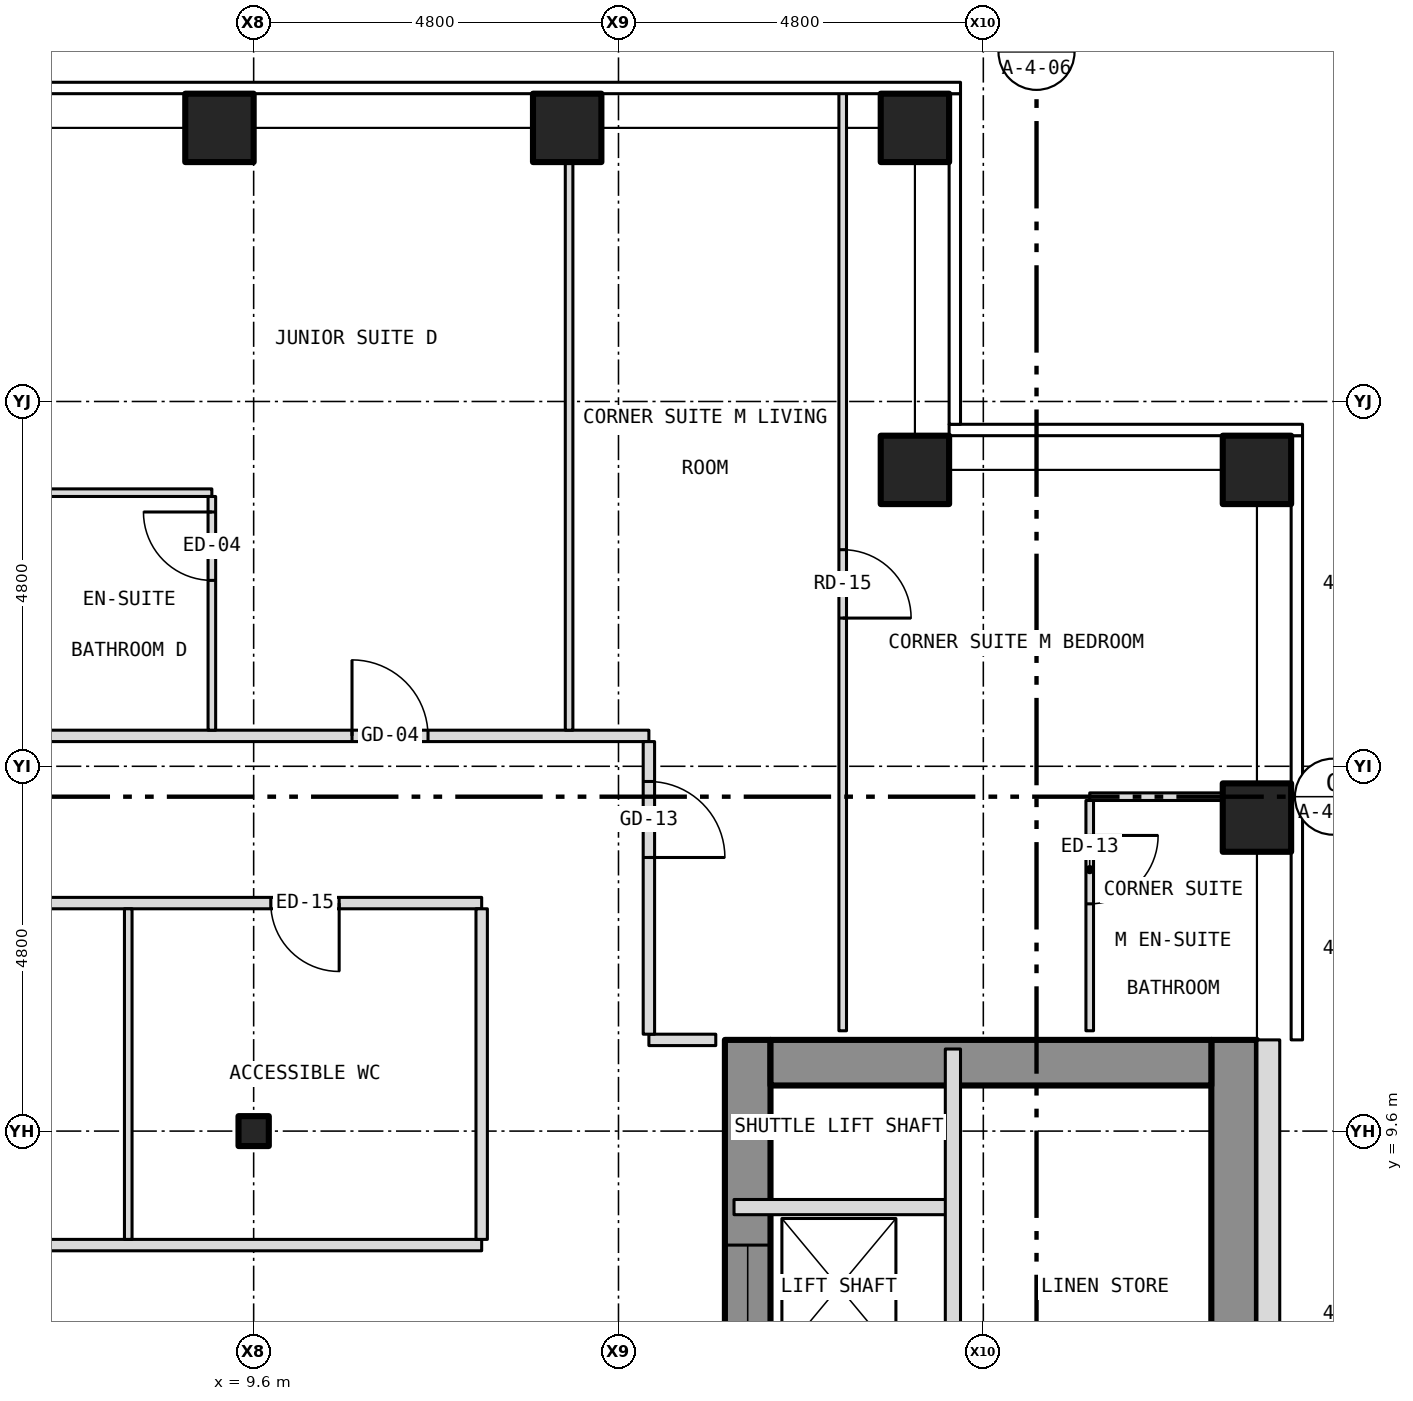
"""IFC4 building model, lengths in metres.
Left out: names, types, materials, properties, quantities, classifications, styles, units other than length and angle.
Written with IfcOpenShell. Run it as: python <this file> out.ifc"""

import sys

from ifc_helpers import new_model, si_unit, direction, frame, frame_2d, origin, origin_2d, place, context, subcontext, project, spatial, rectangle, hollow_rectangle, i_section, extrude, element, fill, save


model = new_model("IFC4")
c1 = context("Model", 3, precision=1e-05, world=origin(), true_north=direction((0.0, 1.0)))
c2 = subcontext(c1, "Body", "Model", "MODEL_VIEW")
j1 = project(units=[si_unit("LENGTHUNIT", "METRE"), si_unit("PLANEANGLEUNIT", "RADIAN")], contexts=[c1])
p1 = place(None, origin())
s1 = spatial("IfcSite", under=j1, at=p1, CompositionType="ELEMENT")
p2 = place(p1, origin())
s2 = spatial("IfcBuilding", under=s1, at=p2, CompositionType="ELEMENT")
p3 = place(p2, frame((0.0, 0.0, 96.0)))
s3 = spatial("IfcBuildingStorey", under=s2, at=p3, CompositionType="ELEMENT", Elevation=96.0)
for number, where, z_axis, x_axis in (
    (1, (9.15, 22.8, -0.15), (0.0, 0.0, 1.0), (1.0, 0.0, 0.0)),
    (2, (13.725, 22.8, -0.15), (0.0, 0.0, 1.0), (1.0, 0.0, 0.0)),
    (3, (18.3, 22.8, -0.15), (0.0, 0.0, 1.0), (1.0, 0.0, 0.0)),
    (4, (22.8, 13.725, -0.15), (0.0, 0.0, 1.0), (1.0, 0.0, 0.0)),
    (5, (22.8, 18.3, -0.15), (0.0, 0.0, 1.0), (1.0, 0.0, 0.0)),
    (6, (18.3, 18.3, -0.15), (0.0, 0.0, 1.0), (1.0, 0.0, 0.0)),
):
    element("IfcColumn", number, at=place(p3, frame(where, z_axis=z_axis, x_axis=x_axis)), inside=s3, PredefinedType="COLUMN", context=c2, shape_type="SweptSolid", body=[
        extrude(hollow_rectangle(XDim=0.9, YDim=0.9, WallThickness=0.05, at=origin_2d()), origin(), (0.0, 0.0, 1.0), 3.5),
    ])
p4 = place(p3, frame((9.6, 9.6, -0.15), z_axis=(0.0, 0.0, 1.0), x_axis=(1.0, 0.0, 0.0)))
e7 = element("IfcColumn", 7, at=p4, inside=s3, PredefinedType="COLUMN", context=c2, shape_type="SweptSolid", body=[
    extrude(i_section(OverallWidth=0.399, OverallDepth=0.394, WebThickness=0.023, FlangeThickness=0.037, at=origin_2d()), origin(), (0.0, 0.0, 1.0), 3.5),
])
p5 = place(p3, frame((16.1, -10.8, 0.0), z_axis=(0.0, 0.0, 1.0), x_axis=(0.0, 1.0, 0.0)))
e8 = element("IfcWall", 8, at=p5, inside=s3, PredefinedType="SHEAR", context=c2, shape_type="SweptSolid", body=[
    extrude(rectangle(XDim=21.6, YDim=0.6, at=frame_2d((10.8, 0.0))), origin(), (0.0, 0.0, 1.0), 3.25),
])
p6 = place(p5, frame((9.4, 0.0, 0.0)))
e9 = element("IfcOpeningElement", 9, at=p6, cuts=e8, PredefinedType="OPENING", context=c2, shape_type="SweptSolid", body=[
    extrude(rectangle(XDim=1.1, YDim=2.1, at=frame_2d((0.55, 1.05))), frame((0.0, 0.312, 0.0), z_axis=(0.0, -1.0, 0.0), x_axis=(1.0, 0.0, 0.0)), (0.0, 0.0, 1.0), 0.624),
])
p7 = place(p5, frame((11.5, 0.0, 0.0)))
e10 = element("IfcOpeningElement", 10, at=p7, cuts=e8, PredefinedType="OPENING", context=c2, shape_type="SweptSolid", body=[
    extrude(rectangle(XDim=1.1, YDim=2.1, at=frame_2d((0.55, 1.05))), frame((0.0, 0.312, 0.0), z_axis=(0.0, -1.0, 0.0), x_axis=(1.0, 0.0, 0.0)), (0.0, 0.0, 1.0), 0.624),
])
p8 = place(p5, frame((13.6, 0.0, 0.0)))
e11 = element("IfcOpeningElement", 11, at=p8, cuts=e8, PredefinedType="OPENING", context=c2, shape_type="SweptSolid", body=[
    extrude(rectangle(XDim=1.1, YDim=2.1, at=frame_2d((0.55, 1.05))), frame((0.0, 0.312, 0.0), z_axis=(0.0, -1.0, 0.0), x_axis=(1.0, 0.0, 0.0)), (0.0, 0.0, 1.0), 0.624),
])
p9 = place(p5, frame((15.7, 0.0, 0.0)))
e12 = element("IfcOpeningElement", 12, at=p9, cuts=e8, PredefinedType="OPENING", context=c2, shape_type="SweptSolid", body=[
    extrude(rectangle(XDim=1.1, YDim=2.1, at=frame_2d((0.55, 1.05))), frame((0.0, 0.312, 0.0), z_axis=(0.0, -1.0, 0.0), x_axis=(1.0, 0.0, 0.0)), (0.0, 0.0, 1.0), 0.624),
])
p10 = place(p5, frame((17.8, 0.0, 0.0)))
e13 = element("IfcOpeningElement", 13, at=p10, cuts=e8, PredefinedType="OPENING", context=c2, shape_type="SweptSolid", body=[
    extrude(rectangle(XDim=1.1, YDim=2.1, at=frame_2d((0.55, 1.05))), frame((0.0, 0.312, 0.0), z_axis=(0.0, -1.0, 0.0), x_axis=(1.0, 0.0, 0.0)), (0.0, 0.0, 1.0), 0.624),
])
p11 = place(p5, frame((5.642, 0.0, 0.0)))
e14 = element("IfcOpeningElement", 14, at=p11, cuts=e8, PredefinedType="OPENING", context=c2, shape_type="SweptSolid", body=[
    extrude(rectangle(XDim=1.1, YDim=2.1, at=frame_2d((0.55, 1.05))), frame((0.0, 0.312, 0.0), z_axis=(0.0, -1.0, 0.0), x_axis=(1.0, 0.0, 0.0)), (0.0, 0.0, 1.0), 0.624),
])
p12 = place(p5, frame((7.5, 0.0, 0.0)))
e15 = element("IfcOpeningElement", 15, at=p12, cuts=e8, PredefinedType="OPENING", context=c2, shape_type="SweptSolid", body=[
    extrude(rectangle(XDim=1.1, YDim=2.1, at=frame_2d((0.55, 1.05))), frame((0.0, 0.312, 0.0), z_axis=(0.0, -1.0, 0.0), x_axis=(1.0, 0.0, 0.0)), (0.0, 0.0, 1.0), 0.624),
])
p13 = place(p3, frame((22.5, -10.8, 0.0), z_axis=(0.0, 0.0, 1.0), x_axis=(0.0, 1.0, 0.0)))
e16 = element("IfcWall", 16, at=p13, inside=s3, PredefinedType="SHEAR", context=c2, shape_type="SweptSolid", body=[
    extrude(rectangle(XDim=21.6, YDim=0.6, at=frame_2d((10.8, 0.0))), origin(), (0.0, 0.0, 1.0), 3.25),
])
p14 = place(p3, frame((16.4, 10.5, 0.0), z_axis=(0.0, 0.0, 1.0), x_axis=(1.0, 0.0, 0.0)))
e17 = element("IfcWall", 17, at=p14, inside=s3, PredefinedType="SHEAR", context=c2, shape_type="SweptSolid", body=[
    extrude(rectangle(XDim=5.8, YDim=0.6, at=frame_2d((2.9, 0.0))), origin(), (0.0, 0.0, 1.0), 3.25),
])
p15 = place(p3, frame((22.95, -10.8, 0.0), z_axis=(0.0, 0.0, 1.0), x_axis=(0.0, 1.0, 0.0)))
e18 = element("IfcWall", 18, at=p15, inside=s3, PredefinedType="SOLIDWALL", context=c2, shape_type="SweptSolid", body=[
    extrude(rectangle(XDim=21.6, YDim=0.3, at=frame_2d((10.8, 0.0))), origin(), (0.0, 0.0, 1.0), 3.5),
])
p16 = place(p15, frame((2.95, 0.0, 1.0)))
e19 = element("IfcOpeningElement", 19, at=p16, cuts=e18, PredefinedType="OPENING", context=c2, shape_type="SweptSolid", body=[
    extrude(rectangle(XDim=0.6, YDim=1.5, at=frame_2d((0.3, 0.75))), frame((0.0, 0.162, 0.0), z_axis=(0.0, -1.0, 0.0), x_axis=(1.0, 0.0, 0.0)), (0.0, 0.0, 1.0), 0.324),
])
p17 = place(p3, frame((3.3, 8.1, 0.0), z_axis=(0.0, 0.0, 1.0), x_axis=(1.0, 0.0, 0.0)))
e20 = element("IfcWall", 20, at=p17, inside=s3, PredefinedType="PARTITIONING", context=c2, shape_type="SweptSolid", body=[
    extrude(rectangle(XDim=9.3, YDim=0.15, at=frame_2d((4.65, 0.0))), origin(), (0.0, 0.0, 1.0), 3.35),
])
p18 = place(p3, frame((15.92, 8.6, 0.0), z_axis=(0.0, 0.0, 1.0), x_axis=(1.0, 0.0, 0.0)))
e21 = element("IfcWall", 21, at=p18, inside=s3, PredefinedType="PARTITIONING", context=c2, shape_type="SweptSolid", body=[
    extrude(rectangle(XDim=2.88, YDim=0.2, at=frame_2d((1.44, 0.0))), origin(), (0.0, 0.0, 1.0), 3.25),
])
p19 = place(p3, frame((14.8, 10.8, 0.0), z_axis=(0.0, 0.0, 1.0), x_axis=(1.0, 0.0, 0.0)))
e22 = element("IfcWall", 22, at=p19, inside=s3, PredefinedType="PARTITIONING", context=c2, shape_type="SweptSolid", body=[
    extrude(rectangle(XDim=0.88, YDim=0.15, at=frame_2d((0.44, 0.0))), origin(), (0.0, 0.0, 1.0), 3.35),
])
p20 = place(p3, frame((3.3, 12.6, 0.0), z_axis=(0.0, 0.0, 1.0), x_axis=(1.0, 0.0, 0.0)))
e23 = element("IfcWall", 23, at=p20, inside=s3, PredefinedType="PARTITIONING", context=c2, shape_type="SweptSolid", body=[
    extrude(rectangle(XDim=9.3, YDim=0.15, at=frame_2d((4.65, 0.0))), origin(), (0.0, 0.0, 1.0), 3.35),
])
p21 = place(p20, frame((1.875, 0.0, 0.0)))
e24 = element("IfcOpeningElement", 24, at=p21, cuts=e23, PredefinedType="OPENING", context=c2, shape_type="SweptSolid", body=[
    extrude(rectangle(XDim=0.9, YDim=2.1, at=frame_2d((0.45, 1.05))), frame((0.0, 0.087, 0.0), z_axis=(0.0, -1.0, 0.0), x_axis=(1.0, 0.0, 0.0)), (0.0, 0.0, 1.0), 0.174),
])
p22 = place(p20, frame((6.525, 0.0, 0.0)))
e25 = element("IfcOpeningElement", 25, at=p22, cuts=e23, PredefinedType="OPENING", context=c2, shape_type="SweptSolid", body=[
    extrude(rectangle(XDim=0.9, YDim=2.1, at=frame_2d((0.45, 1.05))), frame((0.0, 0.087, 0.0), z_axis=(0.0, -1.0, 0.0), x_axis=(1.0, 0.0, 0.0)), (0.0, 0.0, 1.0), 0.174),
])
p23 = place(p3, frame((20.6, 14.0, 0.0), z_axis=(0.0, 0.0, 1.0), x_axis=(1.0, 0.0, 0.0)))
e26 = element("IfcWall", 26, at=p23, inside=s3, PredefinedType="PARTITIONING", context=c2, shape_type="SweptSolid", body=[
    extrude(rectangle(XDim=2.08, YDim=0.1, at=frame_2d((1.04, 0.0))), origin(), (0.0, 0.0, 1.0), 3.35),
])
p24 = place(p3, frame((-14.8, 14.8, 0.0), z_axis=(0.0, 0.0, 1.0), x_axis=(1.0, 0.0, 0.0)))
e27 = element("IfcWall", 27, at=p24, inside=s3, PredefinedType="PARTITIONING", context=c2, shape_type="SweptSolid", body=[
    extrude(rectangle(XDim=29.6, YDim=0.15, at=frame_2d((14.8, 0.0))), origin(), (0.0, 0.0, 1.0), 3.35),
])
p25 = place(p24, frame((5.107, 0.0, 0.0)))
e28 = element("IfcOpeningElement", 28, at=p25, cuts=e27, PredefinedType="OPENING", context=c2, shape_type="SweptSolid", body=[
    extrude(rectangle(XDim=1.0, YDim=2.1, at=frame_2d((0.5, 1.05))), frame((0.0, 0.087, 0.0), z_axis=(0.0, -1.0, 0.0), x_axis=(1.0, 0.0, 0.0)), (0.0, 0.0, 1.0), 0.174),
])
p26 = place(p24, frame((10.826, 0.0, 0.0)))
e29 = element("IfcOpeningElement", 29, at=p26, cuts=e27, PredefinedType="OPENING", context=c2, shape_type="SweptSolid", body=[
    extrude(rectangle(XDim=1.0, YDim=2.1, at=frame_2d((0.5, 1.05))), frame((0.0, 0.087, 0.0), z_axis=(0.0, -1.0, 0.0), x_axis=(1.0, 0.0, 0.0)), (0.0, 0.0, 1.0), 0.174),
])
p27 = place(p24, frame((19.104, 0.0, 0.0)))
e30 = element("IfcOpeningElement", 30, at=p27, cuts=e27, PredefinedType="OPENING", context=c2, shape_type="SweptSolid", body=[
    extrude(rectangle(XDim=1.0, YDim=2.1, at=frame_2d((0.5, 1.05))), frame((0.0, 0.087, 0.0), z_axis=(0.0, -1.0, 0.0), x_axis=(1.0, 0.0, 0.0)), (0.0, 0.0, 1.0), 0.174),
])
p28 = place(p24, frame((25.694, 0.0, 0.0)))
e31 = element("IfcOpeningElement", 31, at=p28, cuts=e27, PredefinedType="OPENING", context=c2, shape_type="SweptSolid", body=[
    extrude(rectangle(XDim=1.0, YDim=2.1, at=frame_2d((0.5, 1.05))), frame((0.0, 0.087, 0.0), z_axis=(0.0, -1.0, 0.0), x_axis=(1.0, 0.0, 0.0)), (0.0, 0.0, 1.0), 0.174),
])
p29 = place(p3, frame((6.85, 18.0, 0.0), z_axis=(0.0, 0.0, 1.0), x_axis=(1.0, 0.0, 0.0)))
e32 = element("IfcWall", 32, at=p29, inside=s3, PredefinedType="PARTITIONING", context=c2, shape_type="SweptSolid", body=[
    extrude(rectangle(XDim=2.2, YDim=0.1, at=frame_2d((1.1, 0.0))), origin(), (0.0, 0.0, 1.0), 3.35),
])
p30 = place(p3, frame((7.95, 8.175, 0.0), z_axis=(0.0, 0.0, 1.0), x_axis=(0.0, 1.0, 0.0)))
e33 = element("IfcWall", 33, at=p30, inside=s3, PredefinedType="PARTITIONING", context=c2, shape_type="SweptSolid", body=[
    extrude(rectangle(XDim=4.35, YDim=0.1, at=frame_2d((2.175, 0.0))), origin(), (0.0, 0.0, 1.0), 3.35),
])
p31 = place(p3, frame((9.05, 14.875, 0.0), z_axis=(0.0, 0.0, 1.0), x_axis=(0.0, 1.0, 0.0)))
e34 = element("IfcWall", 34, at=p31, inside=s3, PredefinedType="PARTITIONING", context=c2, shape_type="SweptSolid", body=[
    extrude(rectangle(XDim=3.075, YDim=0.1, at=frame_2d((1.538, 0.0))), origin(), (0.0, 0.0, 1.0), 3.35),
])
p32 = place(p31, frame((1.971, 0.0, 0.0)))
e35 = element("IfcOpeningElement", 35, at=p32, cuts=e34, PredefinedType="OPENING", context=c2, shape_type="SweptSolid", body=[
    extrude(rectangle(XDim=0.9, YDim=2.1, at=frame_2d((0.45, 1.05))), frame((0.0, 0.062, 0.0), z_axis=(0.0, -1.0, 0.0), x_axis=(1.0, 0.0, 0.0)), (0.0, 0.0, 1.0), 0.124),
])
p33 = place(p3, frame((12.6, 8.175, 0.0), z_axis=(0.0, 0.0, 1.0), x_axis=(0.0, 1.0, 0.0)))
e36 = element("IfcWall", 36, at=p33, inside=s3, PredefinedType="PARTITIONING", context=c2, shape_type="SweptSolid", body=[
    extrude(rectangle(XDim=4.35, YDim=0.15, at=frame_2d((2.175, 0.0))), origin(), (0.0, 0.0, 1.0), 3.35),
])
p34 = place(p3, frame((13.75, 14.875, 0.0), z_axis=(0.0, 0.0, 1.0), x_axis=(0.0, 1.0, 0.0)))
e37 = element("IfcWall", 37, at=p34, inside=s3, PredefinedType="PARTITIONING", context=c2, shape_type="SweptSolid", body=[
    extrude(rectangle(XDim=7.805, YDim=0.1, at=frame_2d((3.902, 0.0))), origin(), (0.0, 0.0, 1.0), 3.35),
])
p35 = place(p3, frame((14.8, 10.875, 0.0), z_axis=(0.0, 0.0, 1.0), x_axis=(0.0, 1.0, 0.0)))
e38 = element("IfcWall", 38, at=p35, inside=s3, PredefinedType="PARTITIONING", context=c2, shape_type="SweptSolid", body=[
    extrude(rectangle(XDim=3.85, YDim=0.15, at=frame_2d((1.925, 0.0))), origin(), (0.0, 0.0, 1.0), 3.35),
])
p36 = place(p35, frame((2.325, 0.0, 0.0)))
e39 = element("IfcOpeningElement", 39, at=p36, cuts=e38, PredefinedType="OPENING", context=c2, shape_type="SweptSolid", body=[
    extrude(rectangle(XDim=1.0, YDim=2.1, at=frame_2d((0.5, 1.05))), frame((0.0, 0.087, 0.0), z_axis=(0.0, -1.0, 0.0), x_axis=(1.0, 0.0, 0.0)), (0.0, 0.0, 1.0), 0.174),
])
p37 = place(p3, frame((17.35, 10.92, 0.0), z_axis=(0.0, 0.0, 1.0), x_axis=(0.0, 1.0, 0.0)))
e40 = element("IfcWall", 40, at=p37, inside=s3, PredefinedType="PARTITIONING", context=c2, shape_type="SweptSolid", body=[
    extrude(rectangle(XDim=12.36, YDim=0.1, at=frame_2d((6.18, 0.0))), origin(), (0.0, 0.0, 1.0), 3.35),
])
p38 = place(p37, frame((5.43, 0.0, 0.0)))
e41 = element("IfcOpeningElement", 41, at=p38, cuts=e40, PredefinedType="OPENING", context=c2, shape_type="SweptSolid", body=[
    extrude(rectangle(XDim=0.9, YDim=2.1, at=frame_2d((0.45, 1.05))), frame((0.0, 0.062, 0.0), z_axis=(0.0, -1.0, 0.0), x_axis=(1.0, 0.0, 0.0)), (0.0, 0.0, 1.0), 0.124),
])
p39 = place(p3, frame((18.8, 4.45, 0.0), z_axis=(0.0, 0.0, 1.0), x_axis=(0.0, 1.0, 0.0)))
e42 = element("IfcWall", 42, at=p39, inside=s3, PredefinedType="PARTITIONING", context=c2, shape_type="SweptSolid", body=[
    extrude(rectangle(XDim=6.23, YDim=0.2, at=frame_2d((3.115, 0.0))), origin(), (0.0, 0.0, 1.0), 3.25),
])
p40 = place(p3, frame((20.6, 10.92, 0.0), z_axis=(0.0, 0.0, 1.0), x_axis=(0.0, 1.0, 0.0)))
e43 = element("IfcWall", 43, at=p40, inside=s3, PredefinedType="PARTITIONING", context=c2, shape_type="SweptSolid", body=[
    extrude(rectangle(XDim=3.03, YDim=0.1, at=frame_2d((1.515, 0.0))), origin(), (0.0, 0.0, 1.0), 3.35),
])
p41 = place(p40, frame((1.67, 0.0, 0.0)))
e44 = element("IfcOpeningElement", 44, at=p41, cuts=e43, PredefinedType="OPENING", context=c2, shape_type="SweptSolid", body=[
    extrude(rectangle(XDim=0.9, YDim=2.1, at=frame_2d((0.45, 1.05))), frame((0.0, 0.062, 0.0), z_axis=(0.0, -1.0, 0.0), x_axis=(1.0, 0.0, 0.0)), (0.0, 0.0, 1.0), 0.124),
])
p42 = place(p10, origin())
e45 = element("IfcDoor", 45, at=p42, inside=s3, OperationType="SLIDING_TO_LEFT", PredefinedType="DOOR", context=c2, shape_type="SweptSolid", body=[
    extrude(rectangle(XDim=1.1, YDim=2.1, at=frame_2d((0.55, 1.05))), frame((0.0, 0.025, 0.0), z_axis=(0.0, -1.0, 0.0), x_axis=(1.0, 0.0, 0.0)), (0.0, 0.0, 1.0), 0.05),
])
fill(e13, e45)
p43 = place(p28, origin())
e46 = element("IfcDoor", 46, at=p43, inside=s3, OperationType="SINGLE_SWING_LEFT", PredefinedType="DOOR", context=c2, shape_type="SweptSolid", body=[
    extrude(rectangle(XDim=1.0, YDim=2.1, at=frame_2d((0.5, 1.05))), frame((0.0, 0.025, 0.0), z_axis=(0.0, -1.0, 0.0), x_axis=(1.0, 0.0, 0.0)), (0.0, 0.0, 1.0), 0.05),
])
fill(e31, e46)
p44 = place(p32, origin())
e47 = element("IfcDoor", 47, at=p44, inside=s3, OperationType="SINGLE_SWING_RIGHT", PredefinedType="DOOR", context=c2, shape_type="SweptSolid", body=[
    extrude(rectangle(XDim=0.9, YDim=2.1, at=frame_2d((0.45, 1.05))), frame((0.0, 0.025, 0.0), z_axis=(0.0, -1.0, 0.0), x_axis=(1.0, 0.0, 0.0)), (0.0, 0.0, 1.0), 0.05),
])
fill(e35, e47)
p45 = place(p36, origin())
e48 = element("IfcDoor", 48, at=p45, inside=s3, OperationType="SINGLE_SWING_LEFT", PredefinedType="DOOR", context=c2, shape_type="SweptSolid", body=[
    extrude(rectangle(XDim=1.0, YDim=2.1, at=frame_2d((0.5, 1.05))), frame((0.0, 0.025, 0.0), z_axis=(0.0, -1.0, 0.0), x_axis=(1.0, 0.0, 0.0)), (0.0, 0.0, 1.0), 0.05),
])
fill(e39, e48)
p46 = place(p38, origin())
e49 = element("IfcDoor", 49, at=p46, inside=s3, OperationType="SINGLE_SWING_LEFT", PredefinedType="DOOR", context=c2, shape_type="SweptSolid", body=[
    extrude(rectangle(XDim=0.9, YDim=2.1, at=frame_2d((0.45, 1.05))), frame((0.0, 0.025, 0.0), z_axis=(0.0, -1.0, 0.0), x_axis=(1.0, 0.0, 0.0)), (0.0, 0.0, 1.0), 0.05),
])
fill(e41, e49)
p47 = place(p41, origin())
e50 = element("IfcDoor", 50, at=p47, inside=s3, OperationType="SINGLE_SWING_RIGHT", PredefinedType="DOOR", context=c2, shape_type="SweptSolid", body=[
    extrude(rectangle(XDim=0.9, YDim=2.1, at=frame_2d((0.45, 1.05))), frame((0.0, 0.025, 0.0), z_axis=(0.0, -1.0, 0.0), x_axis=(1.0, 0.0, 0.0)), (0.0, 0.0, 1.0), 0.05),
])
fill(e44, e50)
p48 = place(p22, origin())
e51 = element("IfcDoor", 51, at=p48, inside=s3, OperationType="SINGLE_SWING_RIGHT", PredefinedType="DOOR", context=c2, shape_type="SweptSolid", body=[
    extrude(rectangle(XDim=0.9, YDim=2.1, at=frame_2d((0.45, 1.05))), frame((0.0, 0.025, 0.0), z_axis=(0.0, -1.0, 0.0), x_axis=(1.0, 0.0, 0.0)), (0.0, 0.0, 1.0), 0.05),
])
fill(e25, e51)
save(model, sys.argv[1])
